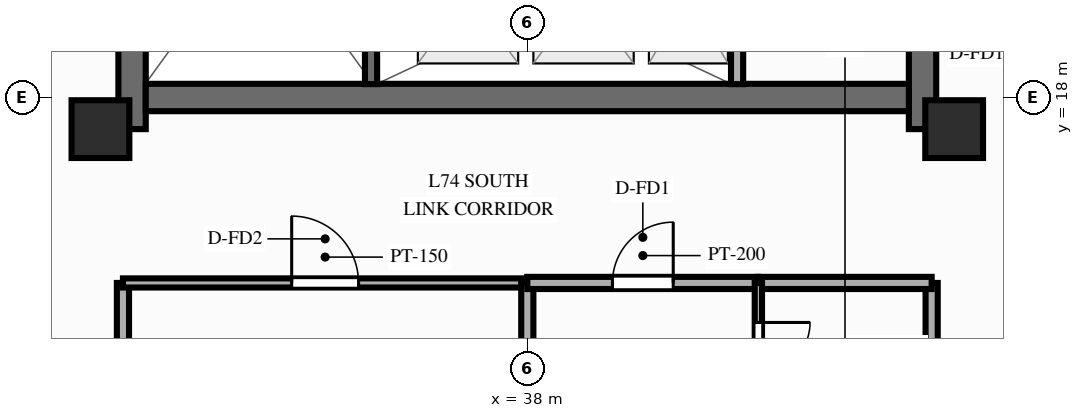
"""IFC4 building model, lengths in metres.
Left out: names, types, materials, properties, quantities, classifications, styles, units other than length and angle.
Written with IfcOpenShell. Run it as: python <this file> out.ifc"""

import sys

from ifc_helpers import new_model, si_unit, direction, frame, frame_2d, origin, origin_2d, place, context, subcontext, project, spatial, rectangle, extrude, source, transform, mapped, element, fill, save


model = new_model("IFC4")
c1 = context("Model", 3, precision=1e-05, world=origin(), true_north=direction((0.0, 1.0)))
c2 = subcontext(c1, "Body", "Model", "MODEL_VIEW")
j1 = project(units=[si_unit("LENGTHUNIT", "METRE"), si_unit("PLANEANGLEUNIT", "RADIAN")], contexts=[c1])
p1 = place(None, origin())
s1 = spatial("IfcSite", under=j1, at=p1, CompositionType="ELEMENT")
p2 = place(p1, origin())
s2 = spatial("IfcBuilding", under=s1, at=p2, CompositionType="ELEMENT")
p3 = place(p2, frame((0.0, 0.0, 240.0)))
s3 = spatial("IfcBuildingStorey", under=s2, at=p3, CompositionType="ELEMENT", Elevation=240.0)
p4 = place(p3, frame((31.5, 17.48, 0.0), z_axis=(0.0, 0.0, 1.0), x_axis=(0.0, 1.0, 0.0)))
e1 = element("IfcWall", 1, at=p4, inside=s3, PredefinedType="SHEAR", context=c2, shape_type="SweptSolid", body=[
    extrude(rectangle(XDim=19.04, YDim=0.45, at=frame_2d((9.52, 0.0))), origin(), (0.0, 0.0, 1.0), 3.0),
])
p5 = place(p4, frame((6.32, 0.0, 0.0)))
e2 = element("IfcOpeningElement", 2, at=p5, cuts=e1, PredefinedType="OPENING", context=c2, shape_type="SweptSolid", body=[
    extrude(rectangle(XDim=1.1, YDim=2.15, at=frame_2d((0.55, 1.075))), frame((0.0, 0.237, 0.0), z_axis=(0.0, -1.0, 0.0), x_axis=(1.0, 0.0, 0.0)), (0.0, 0.0, 1.0), 0.474),
])
p6 = place(p3, frame((44.5, 17.48, 0.0), z_axis=(0.0, 0.0, 1.0), x_axis=(0.0, 1.0, 0.0)))
e3 = element("IfcWall", 3, at=p6, inside=s3, PredefinedType="SHEAR", context=c2, shape_type="SweptSolid", body=[
    extrude(rectangle(XDim=19.04, YDim=0.45, at=frame_2d((9.52, 0.0))), origin(), (0.0, 0.0, 1.0), 3.0),
])
p7 = place(p6, frame((12.67, 0.0, 0.0), z_axis=(0.0, 0.0, 1.0), x_axis=(-1.0, 0.0, 0.0)))
e4 = element("IfcOpeningElement", 4, at=p7, cuts=e3, PredefinedType="OPENING", context=c2, shape_type="SweptSolid", body=[
    extrude(rectangle(XDim=1.1, YDim=2.15, at=frame_2d((0.55, 1.075))), frame((0.0, 0.237, 0.0), z_axis=(0.0, -1.0, 0.0), x_axis=(1.0, 0.0, 0.0)), (0.0, 0.0, 1.0), 0.474),
])
p8 = place(p3, frame((31.725, 18.0, 0.0), z_axis=(0.0, 0.0, 1.0), x_axis=(1.0, 0.0, 0.0)))
e5 = element("IfcWall", 5, at=p8, inside=s3, PredefinedType="SHEAR", context=c2, shape_type="SweptSolid", body=[
    extrude(rectangle(XDim=12.55, YDim=0.45, at=frame_2d((6.275, 0.0))), origin(), (0.0, 0.0, 1.0), 3.0),
])
m1 = source(origin(), c2, "Body", "SweptSolid", [
    extrude(rectangle(XDim=0.95, YDim=0.95, at=origin_2d()), origin(), (0.0, 0.0, 1.0), 3.0),
])
for number, where, z_axis, x_axis in (
    (6, (30.98, 17.48, 0.0), (0.0, 0.0, 1.0), (1.0, 0.0, 0.0)),
    (7, (45.02, 17.48, 0.0), (0.0, 0.0, 1.0), (1.0, 0.0, 0.0)),
):
    element("IfcColumn", number, at=place(p3, frame(where, z_axis=z_axis, x_axis=x_axis)), inside=s3, PredefinedType="COLUMN", context=c2, shape_type="MappedRepresentation", body=[
        mapped(m1, transform((0.0, 0.0, 0.0), scale=1.0)),
    ])
p9 = place(p3, frame((41.45, 18.22, 0.0), z_axis=(0.0, 0.0, 1.0), x_axis=(0.0, 1.0, 0.0)))
e8 = element("IfcWall", 8, at=p9, inside=s3, PredefinedType="PARTITIONING", context=c2, shape_type="SweptSolid", body=[
    extrude(rectangle(XDim=2.86, YDim=0.2, at=frame_2d((1.43, 0.0))), origin(), (0.0, 0.0, 1.0), 2.79),
])
p10 = place(p3, frame((35.43, 18.22, 0.0), z_axis=(0.0, 0.0, 1.0), x_axis=(0.0, 1.0, 0.0)))
e9 = element("IfcWall", 9, at=p10, inside=s3, PredefinedType="SOLIDWALL", context=c2, shape_type="SweptSolid", body=[
    extrude(rectangle(XDim=7.22, YDim=0.2, at=frame_2d((3.61, 0.0))), origin(), (0.0, 0.0, 1.0), 2.79),
])
p11 = place(p10, frame((6.68, 0.0, 0.0), z_axis=(0.0, 0.0, 1.0), x_axis=(-1.0, 0.0, 0.0)))
e10 = element("IfcOpeningElement", 10, at=p11, cuts=e9, PredefinedType="OPENING", context=c2, shape_type="SweptSolid", body=[
    extrude(rectangle(XDim=1.1, YDim=2.15, at=frame_2d((0.55, 1.075))), frame((0.0, 0.112, 0.0), z_axis=(0.0, -1.0, 0.0), x_axis=(1.0, 0.0, 0.0)), (0.0, 0.0, 1.0), 0.224),
])
for number, where, z_axis, x_axis in (
    (11, (31.35, 14.95, 0.0), (0.0, 0.0, 1.0), (0.0, -1.0, 0.0)),
    (12, (44.65, 14.95, 0.0), (0.0, 0.0, 1.0), (0.0, -1.0, 0.0)),
):
    element("IfcWall", number, at=place(p3, frame(where, z_axis=z_axis, x_axis=x_axis)), inside=s3, PredefinedType="PARTITIONING", context=c2, shape_type="SweptSolid", body=[
        extrude(rectangle(XDim=8.8, YDim=0.2, at=frame_2d((4.4, 0.0))), origin(), (0.0, 0.0, 1.0), 2.39),
    ])
p12 = place(p3, frame((31.35, 14.95, 0.0), z_axis=(0.0, 0.0, 1.0), x_axis=(1.0, 0.0, 0.0)))
e13 = element("IfcWall", 13, at=p12, inside=s3, PredefinedType="PARTITIONING", context=c2, shape_type="SweptSolid", body=[
    extrude(rectangle(XDim=6.65, YDim=0.15, at=frame_2d((3.325, 0.0))), origin(), (0.0, 0.0, 1.0), 2.79),
])
p13 = place(p12, frame((2.775, 0.0, 0.0)))
e14 = element("IfcOpeningElement", 14, at=p13, cuts=e13, PredefinedType="OPENING", context=c2, shape_type="SweptSolid", body=[
    extrude(rectangle(XDim=1.1, YDim=2.15, at=frame_2d((0.55, 1.075))), frame((0.0, 0.087, 0.0), z_axis=(0.0, -1.0, 0.0), x_axis=(1.0, 0.0, 0.0)), (0.0, 0.0, 1.0), 0.174),
])
p14 = place(p3, frame((38.0, 14.95, 0.0), z_axis=(0.0, 0.0, 1.0), x_axis=(0.0, -1.0, 0.0)))
e15 = element("IfcWall", 15, at=p14, inside=s3, PredefinedType="PARTITIONING", context=c2, shape_type="SweptSolid", body=[
    extrude(rectangle(XDim=8.8, YDim=0.2, at=frame_2d((4.4, 0.0))), origin(), (0.0, 0.0, 1.0), 2.79),
])
p15 = place(p3, frame((38.0, 14.95, 0.0), z_axis=(0.0, 0.0, 1.0), x_axis=(1.0, 0.0, 0.0)))
e16 = element("IfcWall", 16, at=p15, inside=s3, PredefinedType="PARTITIONING", context=c2, shape_type="SweptSolid", body=[
    extrude(rectangle(XDim=3.8, YDim=0.2, at=frame_2d((1.9, 0.0))), origin(), (0.0, 0.0, 1.0), 2.79),
])
p16 = place(p15, frame((1.4, 0.0, 0.0)))
e17 = element("IfcOpeningElement", 17, at=p16, cuts=e16, PredefinedType="OPENING", context=c2, shape_type="SweptSolid", body=[
    extrude(rectangle(XDim=1.0, YDim=2.15, at=frame_2d((0.5, 1.075))), frame((0.0, 0.112, 0.0), z_axis=(0.0, -1.0, 0.0), x_axis=(1.0, 0.0, 0.0)), (0.0, 0.0, 1.0), 0.224),
])
p17 = place(p3, frame((41.8, 14.95, 0.0), z_axis=(0.0, 0.0, 1.0), x_axis=(1.0, 0.0, 0.0)))
e18 = element("IfcWall", 18, at=p17, inside=s3, PredefinedType="PARTITIONING", context=c2, shape_type="SweptSolid", body=[
    extrude(rectangle(XDim=2.85, YDim=0.2, at=frame_2d((1.425, 0.0))), origin(), (0.0, 0.0, 1.0), 2.79),
])
p18 = place(p3, frame((41.8, 14.95, 0.0), z_axis=(0.0, 0.0, 1.0), x_axis=(0.0, -1.0, 0.0)))
e19 = element("IfcWall", 19, at=p18, inside=s3, PredefinedType="PARTITIONING", context=c2, shape_type="SweptSolid", body=[
    extrude(rectangle(XDim=2.15, YDim=0.12, at=frame_2d((1.075, 0.0))), origin(), (0.0, 0.0, 1.0), 2.79),
])
p19 = place(p18, frame((0.65, 0.0, 0.0)))
e20 = element("IfcOpeningElement", 20, at=p19, cuts=e19, PredefinedType="OPENING", context=c2, shape_type="SweptSolid", body=[
    extrude(rectangle(XDim=0.85, YDim=2.05, at=frame_2d((0.425, 1.025))), frame((0.0, 0.072, 0.0), z_axis=(0.0, -1.0, 0.0), x_axis=(1.0, 0.0, 0.0)), (0.0, 0.0, 1.0), 0.144),
])
m2 = source(origin(), c2, "Body", "SweptSolid", [
    extrude(rectangle(XDim=1.1, YDim=2.15, at=frame_2d((0.55, 1.075))), frame((0.0, 0.025, 0.0), z_axis=(0.0, -1.0, 0.0), x_axis=(1.0, 0.0, 0.0)), (0.0, 0.0, 1.0), 0.05),
])
p20 = place(p13, origin())
e21 = element("IfcDoor", 21, at=p20, inside=s3, OperationType="SINGLE_SWING_LEFT", PredefinedType="DOOR", context=c2, shape_type="MappedRepresentation", body=[
    mapped(m2, transform((0.0, 0.0, 0.0), scale=1.0)),
])
fill(e14, e21)
m3 = source(origin(), c2, "Body", "SweptSolid", [
    extrude(rectangle(XDim=1.0, YDim=2.15, at=frame_2d((0.5, 1.075))), frame((0.0, 0.025, 0.0), z_axis=(0.0, -1.0, 0.0), x_axis=(1.0, 0.0, 0.0)), (0.0, 0.0, 1.0), 0.05),
])
p21 = place(p16, origin())
e22 = element("IfcDoor", 22, at=p21, inside=s3, OperationType="SINGLE_SWING_RIGHT", PredefinedType="DOOR", context=c2, shape_type="MappedRepresentation", body=[
    mapped(m3, transform((0.0, 0.0, 0.0), scale=1.0)),
])
fill(e17, e22)
m4 = source(origin(), c2, "Body", "SweptSolid", [
    extrude(rectangle(XDim=0.85, YDim=2.05, at=frame_2d((0.425, 1.025))), frame((0.0, 0.025, 0.0), z_axis=(0.0, -1.0, 0.0), x_axis=(1.0, 0.0, 0.0)), (0.0, 0.0, 1.0), 0.05),
])
p22 = place(p19, origin())
e23 = element("IfcDoor", 23, at=p22, inside=s3, OperationType="SINGLE_SWING_LEFT", PredefinedType="DOOR", context=c2, shape_type="MappedRepresentation", body=[
    mapped(m4, transform((0.0, 0.0, 0.0), scale=1.0)),
])
fill(e20, e23)
save(model, sys.argv[1])
